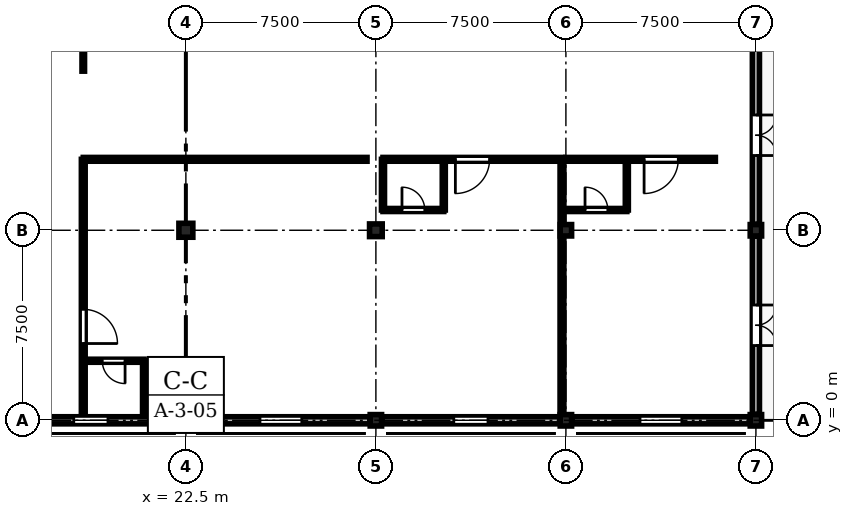
"""IFC4 building model, lengths in metres.
Left out: names, types, materials, properties, quantities, classifications, styles, units other than length and angle.
Written with IfcOpenShell. Run it as: python <this file> out.ifc"""

import sys

from ifc_helpers import new_model, si_unit, direction, frame, frame_2d, origin, origin_2d, place, context, subcontext, project, spatial, rectangle, extrude, element, fill, save


model = new_model("IFC4")
c1 = context("Model", 3, precision=1e-05, world=origin(), true_north=direction((0.0, 1.0)))
c2 = subcontext(c1, "Body", "Model", "MODEL_VIEW")
j1 = project(units=[si_unit("LENGTHUNIT", "METRE"), si_unit("PLANEANGLEUNIT", "RADIAN")], contexts=[c1])
p1 = place(None, origin())
s1 = spatial("IfcSite", under=j1, at=p1, CompositionType="ELEMENT")
p2 = place(p1, origin())
s2 = spatial("IfcBuilding", under=s1, at=p2, CompositionType="ELEMENT")
p3 = place(p2, frame((0.0, 0.0, 25.95)))
s3 = spatial("IfcBuildingStorey", under=s2, at=p3, CompositionType="ELEMENT", Elevation=25.95)
p4 = place(p3, frame((22.5, 0.0, 0.0), z_axis=(0.0, 0.0, 1.0), x_axis=(1.0, 0.0, 0.0)))
e1 = element("IfcColumn", 1, at=p4, inside=s3, PredefinedType="COLUMN", context=c2, shape_type="SweptSolid", body=[
    extrude(rectangle(XDim=0.45, YDim=0.45, at=origin_2d()), origin(), (0.0, 0.0, 1.0), 4.05),
])
p5 = place(p3, frame((22.5, 7.5, 0.0), z_axis=(0.0, 0.0, 1.0), x_axis=(1.0, 0.0, 0.0)))
e2 = element("IfcColumn", 2, at=p5, inside=s3, PredefinedType="COLUMN", context=c2, shape_type="SweptSolid", body=[
    extrude(rectangle(XDim=0.55, YDim=0.55, at=origin_2d()), origin(), (0.0, 0.0, 1.0), 4.05),
])
p6 = place(p3, frame((30.0, 0.0, 0.0), z_axis=(0.0, 0.0, 1.0), x_axis=(1.0, 0.0, 0.0)))
e3 = element("IfcColumn", 3, at=p6, inside=s3, PredefinedType="COLUMN", context=c2, shape_type="SweptSolid", body=[
    extrude(rectangle(XDim=0.45, YDim=0.45, at=origin_2d()), origin(), (0.0, 0.0, 1.0), 4.05),
])
p7 = place(p3, frame((30.0, 7.5, 0.0), z_axis=(0.0, 0.0, 1.0), x_axis=(1.0, 0.0, 0.0)))
e4 = element("IfcColumn", 4, at=p7, inside=s3, PredefinedType="COLUMN", context=c2, shape_type="SweptSolid", body=[
    extrude(rectangle(XDim=0.5, YDim=0.5, at=origin_2d()), origin(), (0.0, 0.0, 1.0), 4.05),
])
for number, where, z_axis, x_axis in (
    (5, (37.5, 0.0, 0.0), (0.0, 0.0, 1.0), (1.0, 0.0, 0.0)),
    (6, (37.5, 7.5, 0.0), (0.0, 0.0, 1.0), (1.0, 0.0, 0.0)),
    (7, (45.0, 0.0, 0.0), (0.0, 0.0, 1.0), (1.0, 0.0, 0.0)),
    (8, (45.0, 7.5, 0.0), (0.0, 0.0, 1.0), (1.0, 0.0, 0.0)),
):
    element("IfcColumn", number, at=place(p3, frame(where, z_axis=z_axis, x_axis=x_axis)), inside=s3, PredefinedType="COLUMN", context=c2, shape_type="SweptSolid", body=[
        extrude(rectangle(XDim=0.45, YDim=0.45, at=origin_2d()), origin(), (0.0, 0.0, 1.0), 4.05),
    ])
p8 = place(p3, frame((22.265, 0.0, 0.0), z_axis=(0.0, 0.0, 1.0), x_axis=(-1.0, 0.0, 0.0)))
e9 = element("IfcWall", 9, at=p8, inside=s3, PredefinedType="STANDARD", context=c2, shape_type="SweptSolid", body=[
    extrude(rectangle(XDim=7.03, YDim=0.28, at=frame_2d((3.515, 0.0))), origin(), (0.0, 0.0, 1.0), 3.17),
])
p9 = place(p8, frame((2.84, 0.0, 0.85)))
e10 = element("IfcOpeningElement", 10, at=p9, cuts=e9, PredefinedType="OPENING", context=c2, shape_type="SweptSolid", body=[
    extrude(rectangle(XDim=1.35, YDim=2.04, at=frame_2d((0.675, 1.02))), frame((0.0, 0.15, 0.0), z_axis=(0.0, -1.0, 0.0), x_axis=(1.0, 0.0, 0.0)), (0.0, 0.0, 1.0), 0.3),
])
p10 = place(p3, frame((29.765, 0.0, 0.0), z_axis=(0.0, 0.0, 1.0), x_axis=(-1.0, 0.0, 0.0)))
e11 = element("IfcWall", 11, at=p10, inside=s3, PredefinedType="STANDARD", context=c2, shape_type="SweptSolid", body=[
    extrude(rectangle(XDim=7.03, YDim=0.28, at=frame_2d((3.515, 0.0))), origin(), (0.0, 0.0, 1.0), 3.17),
])
p11 = place(p10, frame((2.69, 0.0, 0.85)))
e12 = element("IfcOpeningElement", 12, at=p11, cuts=e11, PredefinedType="OPENING", context=c2, shape_type="SweptSolid", body=[
    extrude(rectangle(XDim=1.65, YDim=2.04, at=frame_2d((0.825, 1.02))), frame((0.0, 0.15, 0.0), z_axis=(0.0, -1.0, 0.0), x_axis=(1.0, 0.0, 0.0)), (0.0, 0.0, 1.0), 0.3),
])
p12 = place(p3, frame((37.265, 0.0, 0.0), z_axis=(0.0, 0.0, 1.0), x_axis=(-1.0, 0.0, 0.0)))
e13 = element("IfcWall", 13, at=p12, inside=s3, PredefinedType="STANDARD", context=c2, shape_type="SweptSolid", body=[
    extrude(rectangle(XDim=7.03, YDim=0.28, at=frame_2d((3.515, 0.0))), origin(), (0.0, 0.0, 1.0), 3.17),
])
p13 = place(p12, frame((2.84, 0.0, 0.85)))
e14 = element("IfcOpeningElement", 14, at=p13, cuts=e13, PredefinedType="OPENING", context=c2, shape_type="SweptSolid", body=[
    extrude(rectangle(XDim=1.35, YDim=2.04, at=frame_2d((0.675, 1.02))), frame((0.0, 0.15, 0.0), z_axis=(0.0, -1.0, 0.0), x_axis=(1.0, 0.0, 0.0)), (0.0, 0.0, 1.0), 0.3),
])
p14 = place(p3, frame((44.765, 0.0, 0.0), z_axis=(0.0, 0.0, 1.0), x_axis=(-1.0, 0.0, 0.0)))
e15 = element("IfcWall", 15, at=p14, inside=s3, PredefinedType="STANDARD", context=c2, shape_type="SweptSolid", body=[
    extrude(rectangle(XDim=7.03, YDim=0.28, at=frame_2d((3.515, 0.0))), origin(), (0.0, 0.0, 1.0), 3.17),
])
p15 = place(p14, frame((2.69, 0.0, 0.85)))
e16 = element("IfcOpeningElement", 16, at=p15, cuts=e15, PredefinedType="OPENING", context=c2, shape_type="SweptSolid", body=[
    extrude(rectangle(XDim=1.65, YDim=2.04, at=frame_2d((0.825, 1.02))), frame((0.0, 0.15, 0.0), z_axis=(0.0, -1.0, 0.0), x_axis=(1.0, 0.0, 0.0)), (0.0, 0.0, 1.0), 0.3),
])
p16 = place(p3, frame((45.0, 7.265, 0.0), z_axis=(0.0, 0.0, 1.0), x_axis=(0.0, -1.0, 0.0)))
e17 = element("IfcWall", 17, at=p16, inside=s3, PredefinedType="STANDARD", context=c2, shape_type="SweptSolid", body=[
    extrude(rectangle(XDim=7.03, YDim=0.28, at=frame_2d((3.515, 0.0))), origin(), (0.0, 0.0, 1.0), 3.17),
])
p17 = place(p16, frame((2.715, 0.0, 0.0)))
e18 = element("IfcOpeningElement", 18, at=p17, cuts=e17, PredefinedType="OPENING", context=c2, shape_type="SweptSolid", body=[
    extrude(rectangle(XDim=1.6, YDim=2.35, at=frame_2d((0.8, 1.175))), frame((0.0, 0.15, 0.0), z_axis=(0.0, -1.0, 0.0), x_axis=(1.0, 0.0, 0.0)), (0.0, 0.0, 1.0), 0.3),
])
p18 = place(p3, frame((45.0, 14.765, 0.0), z_axis=(0.0, 0.0, 1.0), x_axis=(0.0, -1.0, 0.0)))
e19 = element("IfcWall", 19, at=p18, inside=s3, PredefinedType="STANDARD", context=c2, shape_type="SweptSolid", body=[
    extrude(rectangle(XDim=7.03, YDim=0.28, at=frame_2d((3.515, 0.0))), origin(), (0.0, 0.0, 1.0), 3.17),
])
p19 = place(p18, frame((2.715, 0.0, 0.0)))
e20 = element("IfcOpeningElement", 20, at=p19, cuts=e19, PredefinedType="OPENING", context=c2, shape_type="SweptSolid", body=[
    extrude(rectangle(XDim=1.6, YDim=2.35, at=frame_2d((0.8, 1.175))), frame((0.0, 0.15, 0.0), z_axis=(0.0, -1.0, 0.0), x_axis=(1.0, 0.0, 0.0)), (0.0, 0.0, 1.0), 0.3),
])
p20 = place(p3, frame((18.45, 10.3, 0.0), z_axis=(0.0, 0.0, 1.0), x_axis=(0.0, -1.0, 0.0)))
e21 = element("IfcWall", 21, at=p20, inside=s3, PredefinedType="PARTITIONING", context=c2, shape_type="SweptSolid", body=[
    extrude(rectangle(XDim=9.95, YDim=0.15, at=frame_2d((4.975, 0.0))), origin(), (0.0, 0.0, 1.0), 3.755),
])
p21 = place(p20, frame((5.92, 0.0, 0.0)))
e22 = element("IfcOpeningElement", 22, at=p21, cuts=e21, PredefinedType="OPENING", context=c2, shape_type="SweptSolid", body=[
    extrude(rectangle(XDim=1.35, YDim=2.25, at=frame_2d((0.675, 1.125))), frame((0.0, 0.085, 0.0), z_axis=(0.0, -1.0, 0.0), x_axis=(1.0, 0.0, 0.0)), (0.0, 0.0, 1.0), 0.17),
])
p22 = place(p3, frame((20.85, 2.35, 0.0), z_axis=(0.0, 0.0, 1.0), x_axis=(-1.0, 0.0, 0.0)))
e23 = element("IfcWall", 23, at=p22, inside=s3, PredefinedType="PARTITIONING", context=c2, shape_type="SweptSolid", body=[
    extrude(rectangle(XDim=2.4, YDim=0.12, at=frame_2d((1.2, 0.0))), origin(), (0.0, 0.0, 1.0), 3.755),
])
p23 = place(p22, frame((0.75, 0.0, 0.0)))
e24 = element("IfcOpeningElement", 24, at=p23, cuts=e23, PredefinedType="OPENING", context=c2, shape_type="SweptSolid", body=[
    extrude(rectangle(XDim=0.9, YDim=2.1, at=frame_2d((0.45, 1.05))), frame((0.0, 0.07, 0.0), z_axis=(0.0, -1.0, 0.0), x_axis=(1.0, 0.0, 0.0)), (0.0, 0.0, 1.0), 0.14),
])
p24 = place(p3, frame((20.85, 0.35, 0.0), z_axis=(0.0, 0.0, 1.0), x_axis=(0.0, 1.0, 0.0)))
e25 = element("IfcWall", 25, at=p24, inside=s3, PredefinedType="PARTITIONING", context=c2, shape_type="SweptSolid", body=[
    extrude(rectangle(XDim=2.0, YDim=0.12, at=frame_2d((1.0, 0.0))), origin(), (0.0, 0.0, 1.0), 3.755),
])
p25 = place(p3, frame((18.45, 21.559, 0.0), z_axis=(0.0, 0.0, 1.0), x_axis=(0.0, -1.0, 0.0)))
e26 = element("IfcWall", 26, at=p25, inside=s3, PredefinedType="PARTITIONING", context=c2, shape_type="SweptSolid", body=[
    extrude(rectangle(XDim=7.779, YDim=0.1, at=frame_2d((3.889, 0.0))), origin(), (0.0, 0.0, 1.0), 3.755),
])
p26 = place(p25, frame((2.089, 0.0, 0.0)))
e27 = element("IfcOpeningElement", 27, at=p26, cuts=e26, PredefinedType="OPENING", context=c2, shape_type="SweptSolid", body=[
    extrude(rectangle(XDim=1.15, YDim=2.2, at=frame_2d((0.575, 1.1))), frame((0.0, 0.06, 0.0), z_axis=(0.0, -1.0, 0.0), x_axis=(1.0, 0.0, 0.0)), (0.0, 0.0, 1.0), 0.12),
])
p27 = place(p3, frame((37.345, 10.3, 0.0), z_axis=(0.0, 0.0, 1.0), x_axis=(-1.0, 0.0, 0.0)))
e28 = element("IfcWall", 28, at=p27, inside=s3, PredefinedType="PARTITIONING", context=c2, shape_type="SweptSolid", body=[
    extrude(rectangle(XDim=7.065, YDim=0.15, at=frame_2d((3.532, 0.0))), origin(), (0.0, 0.0, 1.0), 3.755),
])
p28 = place(p27, frame((2.857, 0.0, 0.0)))
e29 = element("IfcOpeningElement", 29, at=p28, cuts=e28, PredefinedType="OPENING", context=c2, shape_type="SweptSolid", body=[
    extrude(rectangle(XDim=1.35, YDim=2.25, at=frame_2d((0.675, 1.125))), frame((0.0, 0.085, 0.0), z_axis=(0.0, -1.0, 0.0), x_axis=(1.0, 0.0, 0.0)), (0.0, 0.0, 1.0), 0.17),
])
p29 = place(p3, frame((30.28, 8.3, 0.0), z_axis=(0.0, 0.0, 1.0), x_axis=(1.0, 0.0, 0.0)))
e30 = element("IfcWall", 30, at=p29, inside=s3, PredefinedType="PARTITIONING", context=c2, shape_type="SweptSolid", body=[
    extrude(rectangle(XDim=2.4, YDim=0.12, at=frame_2d((1.2, 0.0))), origin(), (0.0, 0.0, 1.0), 3.755),
])
p30 = place(p29, frame((0.75, 0.0, 0.0)))
e31 = element("IfcOpeningElement", 31, at=p30, cuts=e30, PredefinedType="OPENING", context=c2, shape_type="SweptSolid", body=[
    extrude(rectangle(XDim=0.9, YDim=2.1, at=frame_2d((0.45, 1.05))), frame((0.0, 0.07, 0.0), z_axis=(0.0, -1.0, 0.0), x_axis=(1.0, 0.0, 0.0)), (0.0, 0.0, 1.0), 0.14),
])
p31 = place(p3, frame((32.68, 8.3, 0.0), z_axis=(0.0, 0.0, 1.0), x_axis=(0.0, 1.0, 0.0)))
e32 = element("IfcWall", 32, at=p31, inside=s3, PredefinedType="PARTITIONING", context=c2, shape_type="SweptSolid", body=[
    extrude(rectangle(XDim=2.0, YDim=0.12, at=frame_2d((1.0, 0.0))), origin(), (0.0, 0.0, 1.0), 3.755),
])
p32 = place(p3, frame((43.4, 10.3, 0.0), z_axis=(0.0, 0.0, 1.0), x_axis=(-1.0, 0.0, 0.0)))
e33 = element("IfcWall", 33, at=p32, inside=s3, PredefinedType="PARTITIONING", context=c2, shape_type="SweptSolid", body=[
    extrude(rectangle(XDim=5.895, YDim=0.15, at=frame_2d((2.948, 0.0))), origin(), (0.0, 0.0, 1.0), 3.755),
])
p33 = place(p32, frame((1.463, 0.0, 0.0)))
e34 = element("IfcOpeningElement", 34, at=p33, cuts=e33, PredefinedType="OPENING", context=c2, shape_type="SweptSolid", body=[
    extrude(rectangle(XDim=1.35, YDim=2.25, at=frame_2d((0.675, 1.125))), frame((0.0, 0.085, 0.0), z_axis=(0.0, -1.0, 0.0), x_axis=(1.0, 0.0, 0.0)), (0.0, 0.0, 1.0), 0.17),
])
p34 = place(p3, frame((37.505, 8.3, 0.0), z_axis=(0.0, 0.0, 1.0), x_axis=(1.0, 0.0, 0.0)))
e35 = element("IfcWall", 35, at=p34, inside=s3, PredefinedType="PARTITIONING", context=c2, shape_type="SweptSolid", body=[
    extrude(rectangle(XDim=2.4, YDim=0.12, at=frame_2d((1.2, 0.0))), origin(), (0.0, 0.0, 1.0), 3.755),
])
p35 = place(p34, frame((0.75, 0.0, 0.0)))
e36 = element("IfcOpeningElement", 36, at=p35, cuts=e35, PredefinedType="OPENING", context=c2, shape_type="SweptSolid", body=[
    extrude(rectangle(XDim=0.9, YDim=2.1, at=frame_2d((0.45, 1.05))), frame((0.0, 0.07, 0.0), z_axis=(0.0, -1.0, 0.0), x_axis=(1.0, 0.0, 0.0)), (0.0, 0.0, 1.0), 0.14),
])
p36 = place(p3, frame((39.905, 8.3, 0.0), z_axis=(0.0, 0.0, 1.0), x_axis=(0.0, 1.0, 0.0)))
e37 = element("IfcWall", 37, at=p36, inside=s3, PredefinedType="PARTITIONING", context=c2, shape_type="SweptSolid", body=[
    extrude(rectangle(XDim=2.0, YDim=0.12, at=frame_2d((1.0, 0.0))), origin(), (0.0, 0.0, 1.0), 3.755),
])
p37 = place(p3, frame((18.45, 10.3, 0.0), z_axis=(0.0, 0.0, 1.0), x_axis=(1.0, 0.0, 0.0)))
e38 = element("IfcWall", 38, at=p37, inside=s3, PredefinedType="PARTITIONING", context=c2, shape_type="SweptSolid", body=[
    extrude(rectangle(XDim=11.2, YDim=0.15, at=frame_2d((5.6, 0.0))), origin(), (0.0, 0.0, 1.0), 3.755),
])
p38 = place(p3, frame((37.345, 0.35, 0.0), z_axis=(0.0, 0.0, 1.0), x_axis=(0.0, 1.0, 0.0)))
e39 = element("IfcWall", 39, at=p38, inside=s3, PredefinedType="PARTITIONING", context=c2, shape_type="SweptSolid", body=[
    extrude(rectangle(XDim=9.95, YDim=0.15, at=frame_2d((4.975, 0.0))), origin(), (0.0, 0.0, 1.0), 3.205),
])
p39 = place(p3, frame((30.28, 8.3, 0.0), z_axis=(0.0, 0.0, 1.0), x_axis=(0.0, 1.0, 0.0)))
e40 = element("IfcWall", 40, at=p39, inside=s3, PredefinedType="PARTITIONING", context=c2, shape_type="SweptSolid", body=[
    extrude(rectangle(XDim=2.0, YDim=0.12, at=frame_2d((1.0, 0.0))), origin(), (0.0, 0.0, 1.0), 3.255),
])
p40 = place(p9, origin())
e41 = element("IfcWindow", 41, at=p40, inside=s3, PartitioningType="SINGLE_PANEL", PredefinedType="WINDOW", context=c2, shape_type="SweptSolid", body=[
    extrude(rectangle(XDim=1.35, YDim=2.04, at=frame_2d((0.675, 1.02))), frame((0.0, 0.03, 0.0), z_axis=(0.0, -1.0, 0.0), x_axis=(1.0, 0.0, 0.0)), (0.0, 0.0, 1.0), 0.06),
])
fill(e10, e41)
p41 = place(p11, origin())
e42 = element("IfcWindow", 42, at=p41, inside=s3, PartitioningType="SINGLE_PANEL", PredefinedType="WINDOW", context=c2, shape_type="SweptSolid", body=[
    extrude(rectangle(XDim=1.65, YDim=2.04, at=frame_2d((0.825, 1.02))), frame((0.0, 0.03, 0.0), z_axis=(0.0, -1.0, 0.0), x_axis=(1.0, 0.0, 0.0)), (0.0, 0.0, 1.0), 0.06),
])
fill(e12, e42)
p42 = place(p13, origin())
e43 = element("IfcWindow", 43, at=p42, inside=s3, PartitioningType="SINGLE_PANEL", PredefinedType="WINDOW", context=c2, shape_type="SweptSolid", body=[
    extrude(rectangle(XDim=1.35, YDim=2.04, at=frame_2d((0.675, 1.02))), frame((0.0, 0.03, 0.0), z_axis=(0.0, -1.0, 0.0), x_axis=(1.0, 0.0, 0.0)), (0.0, 0.0, 1.0), 0.06),
])
fill(e14, e43)
p43 = place(p15, origin())
e44 = element("IfcWindow", 44, at=p43, inside=s3, PartitioningType="SINGLE_PANEL", PredefinedType="WINDOW", context=c2, shape_type="SweptSolid", body=[
    extrude(rectangle(XDim=1.65, YDim=2.04, at=frame_2d((0.825, 1.02))), frame((0.0, 0.03, 0.0), z_axis=(0.0, -1.0, 0.0), x_axis=(1.0, 0.0, 0.0)), (0.0, 0.0, 1.0), 0.06),
])
fill(e16, e44)
p44 = place(p17, origin())
e45 = element("IfcDoor", 45, at=p44, inside=s3, OperationType="DOUBLE_DOOR_SINGLE_SWING", PredefinedType="DOOR", context=c2, shape_type="SweptSolid", body=[
    extrude(rectangle(XDim=1.6, YDim=2.35, at=frame_2d((0.8, 1.175))), frame((0.0, 0.025, 0.0), z_axis=(0.0, -1.0, 0.0), x_axis=(1.0, 0.0, 0.0)), (0.0, 0.0, 1.0), 0.05),
])
fill(e18, e45)
p45 = place(p19, origin())
e46 = element("IfcDoor", 46, at=p45, inside=s3, OperationType="DOUBLE_DOOR_SINGLE_SWING", PredefinedType="DOOR", context=c2, shape_type="SweptSolid", body=[
    extrude(rectangle(XDim=1.6, YDim=2.35, at=frame_2d((0.8, 1.175))), frame((0.0, 0.025, 0.0), z_axis=(0.0, -1.0, 0.0), x_axis=(1.0, 0.0, 0.0)), (0.0, 0.0, 1.0), 0.05),
])
fill(e20, e46)
p46 = place(p21, origin())
e47 = element("IfcDoor", 47, at=p46, inside=s3, OperationType="SINGLE_SWING_RIGHT", PredefinedType="DOOR", context=c2, shape_type="SweptSolid", body=[
    extrude(rectangle(XDim=1.35, YDim=2.25, at=frame_2d((0.675, 1.125))), frame((0.0, 0.025, 0.0), z_axis=(0.0, -1.0, 0.0), x_axis=(1.0, 0.0, 0.0)), (0.0, 0.0, 1.0), 0.05),
])
fill(e22, e47)
p47 = place(p23, origin())
e48 = element("IfcDoor", 48, at=p47, inside=s3, OperationType="SINGLE_SWING_LEFT", PredefinedType="DOOR", context=c2, shape_type="SweptSolid", body=[
    extrude(rectangle(XDim=0.9, YDim=2.1, at=frame_2d((0.45, 1.05))), frame((0.0, 0.025, 0.0), z_axis=(0.0, -1.0, 0.0), x_axis=(1.0, 0.0, 0.0)), (0.0, 0.0, 1.0), 0.05),
])
fill(e24, e48)
p48 = place(p28, origin())
e49 = element("IfcDoor", 49, at=p48, inside=s3, OperationType="SINGLE_SWING_RIGHT", PredefinedType="DOOR", context=c2, shape_type="SweptSolid", body=[
    extrude(rectangle(XDim=1.35, YDim=2.25, at=frame_2d((0.675, 1.125))), frame((0.0, 0.025, 0.0), z_axis=(0.0, -1.0, 0.0), x_axis=(1.0, 0.0, 0.0)), (0.0, 0.0, 1.0), 0.05),
])
fill(e29, e49)
p49 = place(p30, origin())
e50 = element("IfcDoor", 50, at=p49, inside=s3, OperationType="SINGLE_SWING_LEFT", PredefinedType="DOOR", context=c2, shape_type="SweptSolid", body=[
    extrude(rectangle(XDim=0.9, YDim=2.1, at=frame_2d((0.45, 1.05))), frame((0.0, 0.025, 0.0), z_axis=(0.0, -1.0, 0.0), x_axis=(1.0, 0.0, 0.0)), (0.0, 0.0, 1.0), 0.05),
])
fill(e31, e50)
p50 = place(p33, origin())
e51 = element("IfcDoor", 51, at=p50, inside=s3, OperationType="SINGLE_SWING_RIGHT", PredefinedType="DOOR", context=c2, shape_type="SweptSolid", body=[
    extrude(rectangle(XDim=1.35, YDim=2.25, at=frame_2d((0.675, 1.125))), frame((0.0, 0.025, 0.0), z_axis=(0.0, -1.0, 0.0), x_axis=(1.0, 0.0, 0.0)), (0.0, 0.0, 1.0), 0.05),
])
fill(e34, e51)
p51 = place(p35, origin())
e52 = element("IfcDoor", 52, at=p51, inside=s3, OperationType="SINGLE_SWING_LEFT", PredefinedType="DOOR", context=c2, shape_type="SweptSolid", body=[
    extrude(rectangle(XDim=0.9, YDim=2.1, at=frame_2d((0.45, 1.05))), frame((0.0, 0.025, 0.0), z_axis=(0.0, -1.0, 0.0), x_axis=(1.0, 0.0, 0.0)), (0.0, 0.0, 1.0), 0.05),
])
fill(e36, e52)
save(model, sys.argv[1])
